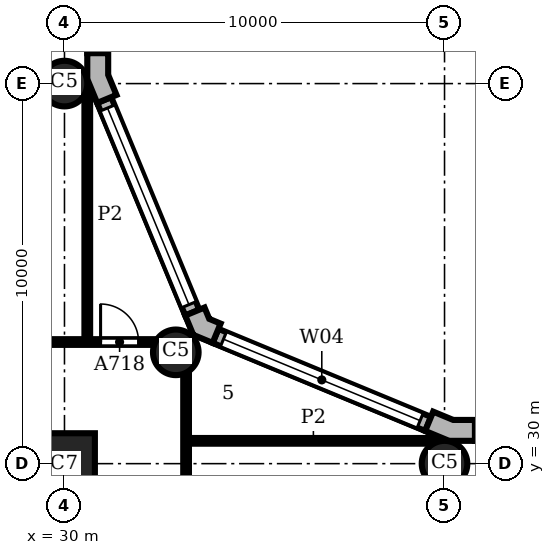
"""IFC4 building model, lengths in metres.
Left out: names, types, materials, properties, quantities, classifications, styles, units other than length and angle.
Written with IfcOpenShell. Run it as: python <this file> out.ifc"""

import sys

from ifc_helpers import new_model, si_unit, direction, frame, frame_2d, origin, origin_2d, place, context, subcontext, project, spatial, polyline, rectangle, circle, outline, extrude, element, fill, save


model = new_model("IFC4")
c1 = context("Model", 3, precision=1e-05, world=origin(), true_north=direction((0.0, 1.0)))
c2 = subcontext(c1, "Body", "Model", "MODEL_VIEW")
j1 = project(units=[si_unit("LENGTHUNIT", "METRE"), si_unit("PLANEANGLEUNIT", "RADIAN")], contexts=[c1])
p1 = place(None, origin())
s1 = spatial("IfcSite", under=j1, at=p1, CompositionType="ELEMENT")
p2 = place(p1, origin())
s2 = spatial("IfcBuilding", under=s1, at=p2, CompositionType="ELEMENT")
p3 = place(p2, frame((0.0, 0.0, 82.2)))
s3 = spatial("IfcBuildingStorey", under=s2, at=p3, CompositionType="ELEMENT", Elevation=82.2)
for number, where, z_axis, x_axis in (
    (1, (40.0, 30.0, 0.0), (0.0, 0.0, 1.0), (1.0, 0.0, 0.0)),
    (2, (32.929, 32.929, 0.0), (0.0, 0.0, 1.0), (1.0, 0.0, 0.0)),
    (3, (30.0, 40.0, 0.0), (0.0, 0.0, 1.0), (1.0, 0.0, 0.0)),
):
    element("IfcColumn", number, at=place(p3, frame(where, z_axis=z_axis, x_axis=x_axis)), inside=s3, PredefinedType="COLUMN", context=c2, shape_type="SweptSolid", body=[
        extrude(circle(Radius=0.6, at=origin_2d()), origin(), (0.0, 0.0, 1.0), 3.9),
    ])
p4 = place(p3, frame((30.0, 30.0, 0.0), z_axis=(0.0, 0.0, 1.0), x_axis=(1.0, 0.0, 0.0)))
e4 = element("IfcColumn", 4, at=p4, inside=s3, PredefinedType="COLUMN", context=c2, shape_type="SweptSolid", body=[
    extrude(rectangle(XDim=1.6, YDim=1.6, at=origin_2d()), origin(), (0.0, 0.0, 1.0), 3.9),
])
p5 = place(p3, origin())
e5 = element("IfcWall", 5, at=p5, inside=s3, PredefinedType="SOLIDWALL", context=c2, shape_type="SweptSolid", body=[
    extrude(outline(polyline([(40.8, 31.0), (40.8, 31.15), (40.229, 31.15), (39.701, 31.369), (39.644, 31.23), (39.49, 30.861), (40.119, 30.6), (40.8, 30.6), (40.8, 31.0)])), origin(), (0.0, 0.0, 1.0), 3.9),
])
e6 = element("IfcWall", 6, at=p5, inside=s3, PredefinedType="SOLIDWALL", context=c2, shape_type="SweptSolid", body=[
    extrude(outline(polyline([(34.051, 33.547), (34.108, 33.685), (33.809, 33.809), (33.685, 34.108), (33.547, 34.051), (33.177, 33.898), (33.388, 33.388), (33.898, 33.177), (34.051, 33.547)])), origin(), (0.0, 0.0, 1.0), 3.9),
])
e7 = element("IfcWall", 7, at=p5, inside=s3, PredefinedType="SOLIDWALL", context=c2, shape_type="SweptSolid", body=[
    extrude(outline(polyline([(31.23, 39.644), (31.369, 39.701), (31.15, 40.229), (31.15, 40.8), (31.0, 40.8), (30.6, 40.8), (30.6, 40.119), (30.861, 39.49), (31.23, 39.644)])), origin(), (0.0, 0.0, 1.0), 3.9),
])
p6 = place(p3, frame((69.2, 30.8, 0.0), z_axis=(0.0, 0.0, 1.0), x_axis=(-1.0, 0.0, 0.0)))
e8 = element("IfcWall", 8, at=p6, inside=s3, PredefinedType="SOLIDWALL", context=c2, shape_type="SweptSolid", body=[
    extrude(rectangle(XDim=28.4, YDim=0.4, at=frame_2d((14.2, 0.0))), origin(), (0.0, 0.0, 1.0), 3.9),
])
p7 = place(p6, frame((0.2, 0.0, 0.9)))
e9 = element("IfcOpeningElement", 9, at=p7, cuts=e8, PredefinedType="OPENING", context=c2, shape_type="SweptSolid", body=[
    extrude(rectangle(XDim=8.0, YDim=2.35, at=frame_2d((4.0, 1.175))), frame((0.0, 0.21, 0.0), z_axis=(0.0, -1.0, 0.0), x_axis=(1.0, 0.0, 0.0)), (0.0, 0.0, 1.0), 0.42),
])
p8 = place(p6, frame((10.2, 0.0, 0.9)))
e10 = element("IfcOpeningElement", 10, at=p8, cuts=e8, PredefinedType="OPENING", context=c2, shape_type="SweptSolid", body=[
    extrude(rectangle(XDim=8.0, YDim=2.35, at=frame_2d((4.0, 1.175))), frame((0.0, 0.21, 0.0), z_axis=(0.0, -1.0, 0.0), x_axis=(1.0, 0.0, 0.0)), (0.0, 0.0, 1.0), 0.42),
])
p9 = place(p6, frame((20.2, 0.0, 0.9)))
e11 = element("IfcOpeningElement", 11, at=p9, cuts=e8, PredefinedType="OPENING", context=c2, shape_type="SweptSolid", body=[
    extrude(rectangle(XDim=8.0, YDim=2.35, at=frame_2d((4.0, 1.175))), frame((0.0, 0.21, 0.0), z_axis=(0.0, -1.0, 0.0), x_axis=(1.0, 0.0, 0.0)), (0.0, 0.0, 1.0), 0.42),
])
p10 = place(p3, frame((39.567, 31.045, 0.0), z_axis=(0.0, 0.0, 1.0), x_axis=(-0.923891000409, 0.382655745237, 0.0)))
e12 = element("IfcWall", 12, at=p10, inside=s3, PredefinedType="SOLIDWALL", context=c2, shape_type="SweptSolid", body=[
    extrude(rectangle(XDim=6.053, YDim=0.4, at=frame_2d((3.027, 0.0))), origin(), (0.0, 0.0, 1.0), 3.9),
])
p11 = place(p10, frame((0.227, 0.0, 0.9)))
e13 = element("IfcOpeningElement", 13, at=p11, cuts=e12, PredefinedType="OPENING", context=c2, shape_type="SweptSolid", body=[
    extrude(rectangle(XDim=5.6, YDim=2.35, at=frame_2d((2.8, 1.175))), frame((0.0, 0.21, 0.0), z_axis=(0.0, -1.0, 0.0), x_axis=(1.0, 0.0, 0.0)), (0.0, 0.0, 1.0), 0.42),
])
p12 = place(p3, frame((33.362, 33.974, 0.0), z_axis=(0.0, 0.0, 1.0), x_axis=(-0.382655745237, 0.923891000409, 0.0)))
e14 = element("IfcWall", 14, at=p12, inside=s3, PredefinedType="SOLIDWALL", context=c2, shape_type="SweptSolid", body=[
    extrude(rectangle(XDim=6.053, YDim=0.4, at=frame_2d((3.027, 0.0))), origin(), (0.0, 0.0, 1.0), 3.9),
])
p13 = place(p12, frame((0.227, 0.0, 0.9)))
e15 = element("IfcOpeningElement", 15, at=p13, cuts=e14, PredefinedType="OPENING", context=c2, shape_type="SweptSolid", body=[
    extrude(rectangle(XDim=5.6, YDim=2.35, at=frame_2d((2.8, 1.175))), frame((0.0, 0.21, 0.0), z_axis=(0.0, -1.0, 0.0), x_axis=(1.0, 0.0, 0.0)), (0.0, 0.0, 1.0), 0.42),
])
p14 = place(p3, frame((30.8, 40.8, 0.0), z_axis=(0.0, 0.0, 1.0), x_axis=(0.0, 1.0, 0.0)))
e16 = element("IfcWall", 16, at=p14, inside=s3, PredefinedType="SOLIDWALL", context=c2, shape_type="SweptSolid", body=[
    extrude(rectangle(XDim=18.4, YDim=0.4, at=frame_2d((9.2, 0.0))), origin(), (0.0, 0.0, 1.0), 3.9),
])
p15 = place(p14, frame((0.2, 0.0, 0.9)))
e17 = element("IfcOpeningElement", 17, at=p15, cuts=e16, PredefinedType="OPENING", context=c2, shape_type="SweptSolid", body=[
    extrude(rectangle(XDim=8.0, YDim=2.35, at=frame_2d((4.0, 1.175))), frame((0.0, 0.21, 0.0), z_axis=(0.0, -1.0, 0.0), x_axis=(1.0, 0.0, 0.0)), (0.0, 0.0, 1.0), 0.42),
])
p16 = place(p14, frame((10.2, 0.0, 0.9)))
e18 = element("IfcOpeningElement", 18, at=p16, cuts=e16, PredefinedType="OPENING", context=c2, shape_type="SweptSolid", body=[
    extrude(rectangle(XDim=8.0, YDim=2.35, at=frame_2d((4.0, 1.175))), frame((0.0, 0.21, 0.0), z_axis=(0.0, -1.0, 0.0), x_axis=(1.0, 0.0, 0.0)), (0.0, 0.0, 1.0), 0.42),
])
p17 = place(p3, frame((30.6, 33.2, 0.0), z_axis=(0.0, 0.0, 1.0), x_axis=(0.0, 1.0, 0.0)))
e19 = element("IfcWall", 19, at=p17, inside=s3, PredefinedType="PARTITIONING", context=c2, shape_type="SweptSolid", body=[
    extrude(rectangle(XDim=6.699, YDim=0.15, at=frame_2d((3.35, 0.0))), origin(), (0.0, 0.0, 1.0), 3.58),
])
p18 = place(p3, frame((33.2, 15.45, 0.0), z_axis=(0.0, 0.0, 1.0), x_axis=(0.0, 1.0, 0.0)))
e20 = element("IfcWall", 20, at=p18, inside=s3, PredefinedType="PARTITIONING", context=c2, shape_type="SweptSolid", body=[
    extrude(rectangle(XDim=16.912, YDim=0.15, at=frame_2d((8.456, 0.0))), origin(), (0.0, 0.0, 1.0), 3.58),
])
p19 = place(p18, frame((11.35, 0.0, 0.0)))
e21 = element("IfcOpeningElement", 21, at=p19, cuts=e20, PredefinedType="OPENING", context=c2, shape_type="SweptSolid", body=[
    extrude(rectangle(XDim=1.8, YDim=2.1, at=frame_2d((0.9, 1.05))), frame((0.0, 0.085, 0.0), z_axis=(0.0, -1.0, 0.0), x_axis=(1.0, 0.0, 0.0)), (0.0, 0.0, 1.0), 0.17),
])
p20 = place(p18, frame((3.35, 0.0, 0.0)))
e22 = element("IfcOpeningElement", 22, at=p20, cuts=e20, PredefinedType="OPENING", context=c2, shape_type="SweptSolid", body=[
    extrude(rectangle(XDim=1.0, YDim=2.1, at=frame_2d((0.5, 1.05))), frame((0.0, 0.085, 0.0), z_axis=(0.0, -1.0, 0.0), x_axis=(1.0, 0.0, 0.0)), (0.0, 0.0, 1.0), 0.17),
])
p21 = place(p3, frame((33.2, 30.6, 0.0), z_axis=(0.0, 0.0, 1.0), x_axis=(1.0, 0.0, 0.0)))
e23 = element("IfcWall", 23, at=p21, inside=s3, PredefinedType="PARTITIONING", context=c2, shape_type="SweptSolid", body=[
    extrude(rectangle(XDim=6.699, YDim=0.15, at=frame_2d((3.35, 0.0))), origin(), (0.0, 0.0, 1.0), 3.58),
])
p22 = place(p3, frame((16.5, 33.2, 0.0), z_axis=(0.0, 0.0, 1.0), x_axis=(1.0, 0.0, 0.0)))
e24 = element("IfcWall", 24, at=p22, inside=s3, PredefinedType="PARTITIONING", context=c2, shape_type="SweptSolid", body=[
    extrude(rectangle(XDim=15.862, YDim=0.15, at=frame_2d((7.931, 0.0))), origin(), (0.0, 0.0, 1.0), 3.58),
])
p23 = place(p22, frame((4.6, 0.0, 0.0)))
e25 = element("IfcOpeningElement", 25, at=p23, cuts=e24, PredefinedType="OPENING", context=c2, shape_type="SweptSolid", body=[
    extrude(rectangle(XDim=1.8, YDim=2.1, at=frame_2d((0.9, 1.05))), frame((0.0, 0.085, 0.0), z_axis=(0.0, -1.0, 0.0), x_axis=(1.0, 0.0, 0.0)), (0.0, 0.0, 1.0), 0.17),
])
p24 = place(p22, frame((14.45, 0.0, 0.0)))
e26 = element("IfcOpeningElement", 26, at=p24, cuts=e24, PredefinedType="OPENING", context=c2, shape_type="SweptSolid", body=[
    extrude(rectangle(XDim=1.0, YDim=2.1, at=frame_2d((0.5, 1.05))), frame((0.0, 0.085, 0.0), z_axis=(0.0, -1.0, 0.0), x_axis=(1.0, 0.0, 0.0)), (0.0, 0.0, 1.0), 0.17),
])
p25 = place(p11, origin())
e27 = element("IfcWindow", 27, at=p25, inside=s3, PartitioningType="SINGLE_PANEL", PredefinedType="WINDOW", context=c2, shape_type="SweptSolid", body=[
    extrude(rectangle(XDim=5.6, YDim=2.35, at=frame_2d((2.8, 1.175))), frame((0.0, 0.16, 0.0), z_axis=(0.0, -1.0, 0.0), x_axis=(1.0, 0.0, 0.0)), (0.0, 0.0, 1.0), 0.06),
])
fill(e13, e27)
p26 = place(p13, origin())
e28 = element("IfcWindow", 28, at=p26, inside=s3, PartitioningType="SINGLE_PANEL", PredefinedType="WINDOW", context=c2, shape_type="SweptSolid", body=[
    extrude(rectangle(XDim=5.6, YDim=2.35, at=frame_2d((2.8, 1.175))), frame((0.0, 0.16, 0.0), z_axis=(0.0, -1.0, 0.0), x_axis=(1.0, 0.0, 0.0)), (0.0, 0.0, 1.0), 0.06),
])
fill(e15, e28)
p27 = place(p24, origin())
e29 = element("IfcDoor", 29, at=p27, inside=s3, OperationType="SINGLE_SWING_LEFT", PredefinedType="DOOR", context=c2, shape_type="SweptSolid", body=[
    extrude(rectangle(XDim=1.0, YDim=2.1, at=frame_2d((0.5, 1.05))), frame((0.0, 0.025, 0.0), z_axis=(0.0, -1.0, 0.0), x_axis=(1.0, 0.0, 0.0)), (0.0, 0.0, 1.0), 0.05),
])
fill(e26, e29)
save(model, sys.argv[1])
